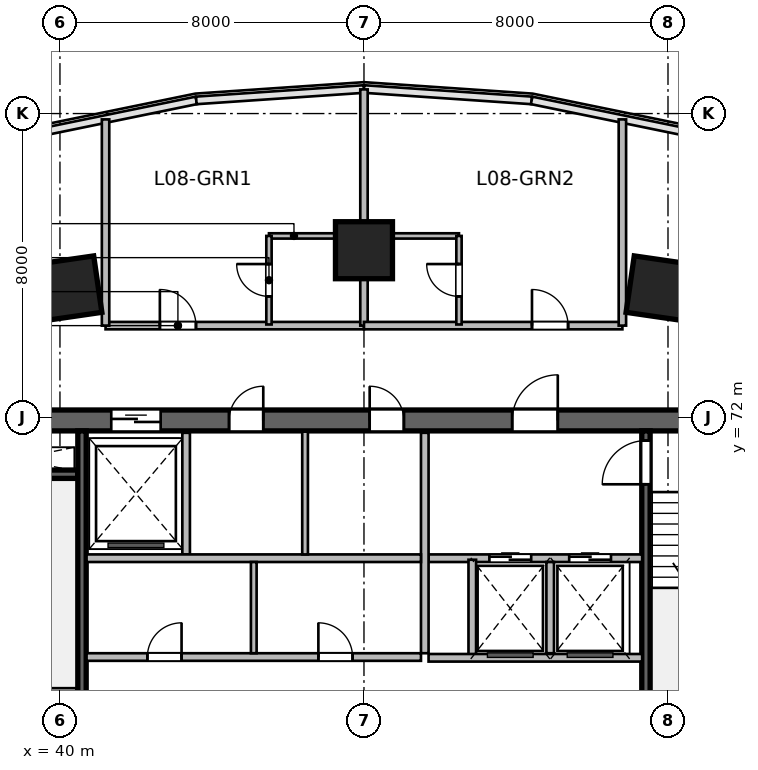
"""IFC4 building model, lengths in metres.
Left out: names, types, materials, properties, quantities, classifications, styles, units other than length and angle.
Written with IfcOpenShell. Run it as: python <this file> out.ifc"""

import sys

from ifc_helpers import new_model, si_unit, direction, frame, frame_2d, origin, origin_2d, place, context, subcontext, project, spatial, rectangle, extrude, source, transform, mapped, element, fill, save


model = new_model("IFC4")
c1 = context("Model", 3, precision=1e-05, world=origin(), true_north=direction((0.0, 1.0)))
c2 = subcontext(c1, "Body", "Model", "MODEL_VIEW")
j1 = project(units=[si_unit("LENGTHUNIT", "METRE"), si_unit("PLANEANGLEUNIT", "RADIAN")], contexts=[c1])
p1 = place(None, origin())
s1 = spatial("IfcSite", under=j1, at=p1, CompositionType="ELEMENT")
p2 = place(p1, origin())
s2 = spatial("IfcBuilding", under=s1, at=p2, CompositionType="ELEMENT")
p3 = place(p2, frame((0.0, 0.0, 42.6)))
s3 = spatial("IfcBuildingStorey", under=s2, at=p3, CompositionType="ELEMENT", Elevation=42.6)
m1 = source(origin(), c2, "Body", "SweptSolid", [
    extrude(rectangle(XDim=21.6, YDim=0.55, at=frame_2d((10.8, 0.0))), origin(), (0.0, 0.0, 1.0), 3.6),
])
p4 = place(p3, frame((37.2, 71.925, 0.0), z_axis=(0.0, 0.0, 1.0), x_axis=(1.0, 0.0, 0.0)))
e1 = element("IfcWall", 1, at=p4, inside=s3, PredefinedType="SHEAR", context=c2, shape_type="MappedRepresentation", body=[
    mapped(m1, transform((0.0, 0.0, 0.0), scale=1.0)),
])
p5 = place(p4, frame((1.2, 0.0, 0.0)))
e2 = element("IfcOpeningElement", 2, at=p5, cuts=e1, PredefinedType="OPENING", context=c2, shape_type="SweptSolid", body=[
    extrude(rectangle(XDim=0.9, YDim=2.1, at=frame_2d((0.45, 1.05))), frame((0.0, 0.285, 0.0), z_axis=(0.0, -1.0, 0.0), x_axis=(1.0, 0.0, 0.0)), (0.0, 0.0, 1.0), 0.57),
])
p6 = place(p4, frame((14.7, 0.0, 0.0)))
e3 = element("IfcOpeningElement", 3, at=p6, cuts=e1, PredefinedType="OPENING", context=c2, shape_type="SweptSolid", body=[
    extrude(rectangle(XDim=1.2, YDim=2.15, at=frame_2d((0.6, 1.075))), frame((0.0, 0.285, 0.0), z_axis=(0.0, -1.0, 0.0), x_axis=(1.0, 0.0, 0.0)), (0.0, 0.0, 1.0), 0.57),
])
p7 = place(p4, frame((4.15, 0.0, 0.0)))
e4 = element("IfcOpeningElement", 4, at=p7, cuts=e1, PredefinedType="OPENING", context=c2, shape_type="SweptSolid", body=[
    extrude(rectangle(XDim=1.3, YDim=2.15, at=frame_2d((0.65, 1.075))), frame((0.0, 0.285, 0.0), z_axis=(0.0, -1.0, 0.0), x_axis=(1.0, 0.0, 0.0)), (0.0, 0.0, 1.0), 0.57),
])
p8 = place(p4, frame((7.25, 0.0, 0.0)))
e5 = element("IfcOpeningElement", 5, at=p8, cuts=e1, PredefinedType="OPENING", context=c2, shape_type="SweptSolid", body=[
    extrude(rectangle(XDim=0.9, YDim=2.1, at=frame_2d((0.45, 1.05))), frame((0.0, 0.285, 0.0), z_axis=(0.0, -1.0, 0.0), x_axis=(1.0, 0.0, 0.0)), (0.0, 0.0, 1.0), 0.57),
])
p9 = place(p4, frame((10.95, 0.0, 0.0)))
e6 = element("IfcOpeningElement", 6, at=p9, cuts=e1, PredefinedType="OPENING", context=c2, shape_type="SweptSolid", body=[
    extrude(rectangle(XDim=0.9, YDim=2.1, at=frame_2d((0.45, 1.05))), frame((0.0, 0.285, 0.0), z_axis=(0.0, -1.0, 0.0), x_axis=(1.0, 0.0, 0.0)), (0.0, 0.0, 1.0), 0.57),
])
m2 = source(origin(), c2, "Body", "SweptSolid", [
    extrude(rectangle(XDim=3.27, YDim=0.22, at=frame_2d((1.635, 0.0))), origin(), (0.0, 0.0, 1.0), 3.6),
])
p10 = place(p3, frame((37.2, 70.51, 0.0), z_axis=(0.0, 0.0, 1.0), x_axis=(1.0, 0.0, 0.0)))
e7 = element("IfcWall", 7, at=p10, inside=s3, PredefinedType="SHEAR", context=c2, shape_type="MappedRepresentation", body=[
    mapped(m2, transform((0.0, 0.0, 0.0), scale=1.0)),
])
m3 = source(origin(), c2, "Body", "SweptSolid", [
    extrude(rectangle(XDim=10.9, YDim=0.22, at=frame_2d((5.45, 0.0))), origin(), (0.0, 0.0, 1.0), 3.6),
])
p11 = place(p3, frame((40.58, 60.75, 0.0), z_axis=(0.0, 0.0, 1.0), x_axis=(0.0, 1.0, 0.0)))
e8 = element("IfcWall", 8, at=p11, inside=s3, PredefinedType="SHEAR", context=c2, shape_type="MappedRepresentation", body=[
    mapped(m3, transform((0.0, 0.0, 0.0), scale=1.0)),
])
p12 = place(p3, frame((55.42, 60.75, 0.0), z_axis=(0.0, 0.0, 1.0), x_axis=(0.0, 1.0, 0.0)))
e9 = element("IfcWall", 9, at=p12, inside=s3, PredefinedType="SHEAR", context=c2, shape_type="MappedRepresentation", body=[
    mapped(m3, transform((0.0, 0.0, 0.0), scale=1.0)),
])
p13 = place(p12, frame((9.495, 0.0, 0.0)))
e10 = element("IfcOpeningElement", 10, at=p13, cuts=e9, PredefinedType="OPENING", context=c2, shape_type="SweptSolid", body=[
    extrude(rectangle(XDim=1.15, YDim=2.15, at=frame_2d((0.575, 1.075))), frame((0.0, 0.12, 0.0), z_axis=(0.0, -1.0, 0.0), x_axis=(1.0, 0.0, 0.0)), (0.0, 0.0, 1.0), 0.24),
])
m4 = source(origin(), c2, "Body", "SweptSolid", [
    extrude(rectangle(XDim=1.5, YDim=1.5, at=origin_2d()), origin(), (0.0, 0.0, 1.0), 3.6),
])
for number, where, z_axis, x_axis in (
    (11, (40.253, 75.404, 0.0), (0.0, 0.0, 1.0), (-0.143, 0.99, 0.0)),
    (12, (48.0, 76.404, 0.0), (0.0, 0.0, 1.0), (0.0, 1.0, 0.0)),
    (13, (55.747, 75.404, 0.0), (0.0, 0.0, 1.0), (0.143, 0.99, 0.0)),
):
    element("IfcColumn", number, at=place(p3, frame(where, z_axis=z_axis, x_axis=x_axis)), inside=s3, PredefinedType="COLUMN", context=c2, shape_type="MappedRepresentation", body=[
        mapped(m4, transform((0.0, 0.0, 0.0), scale=1.0)),
    ])
m5 = source(origin(), c2, "Body", "SweptSolid", [
    extrude(rectangle(XDim=5.62, YDim=0.2, at=frame_2d((2.81, 0.0))), origin(), (0.0, 0.0, 1.0), 3.36),
])
p14 = place(p3, frame((49.7, 68.3, 0.0), z_axis=(0.0, 0.0, 1.0), x_axis=(1.0, 0.0, 0.0)))
e14 = element("IfcWall", 14, at=p14, inside=s3, PredefinedType="SOLIDWALL", context=c2, shape_type="MappedRepresentation", body=[
    mapped(m5, transform((0.0, 0.0, 0.0), scale=1.0)),
])
p15 = place(p14, frame((1.6, 0.0, 0.0)))
e15 = element("IfcOpeningElement", 15, at=p15, cuts=e14, PredefinedType="OPENING", context=c2, shape_type="SweptSolid", body=[
    extrude(rectangle(XDim=1.1, YDim=2.15, at=frame_2d((0.55, 1.075))), frame((0.0, 0.11, 0.0), z_axis=(0.0, -1.0, 0.0), x_axis=(1.0, 0.0, 0.0)), (0.0, 0.0, 1.0), 0.22),
])
p16 = place(p14, frame((3.7, 0.0, 0.0)))
e16 = element("IfcOpeningElement", 16, at=p16, cuts=e14, PredefinedType="OPENING", context=c2, shape_type="SweptSolid", body=[
    extrude(rectangle(XDim=1.1, YDim=2.15, at=frame_2d((0.55, 1.075))), frame((0.0, 0.11, 0.0), z_axis=(0.0, -1.0, 0.0), x_axis=(1.0, 0.0, 0.0)), (0.0, 0.0, 1.0), 0.22),
])
m6 = source(origin(), c2, "Body", "SweptSolid", [
    extrude(rectangle(XDim=5.8, YDim=0.2, at=frame_2d((2.9, 0.0))), origin(), (0.0, 0.0, 1.0), 3.36),
])
p17 = place(p3, frame((49.6, 65.8, 0.0), z_axis=(0.0, 0.0, 1.0), x_axis=(0.0, 1.0, 0.0)))
e17 = element("IfcWall", 17, at=p17, inside=s3, PredefinedType="SOLIDWALL", context=c2, shape_type="MappedRepresentation", body=[
    mapped(m6, transform((0.0, 0.0, 0.0), scale=1.0)),
])
m7 = source(origin(), c2, "Body", "SweptSolid", [
    extrude(rectangle(XDim=2.58, YDim=0.2, at=frame_2d((1.29, 0.0))), origin(), (0.0, 0.0, 1.0), 3.36),
])
p18 = place(p3, frame((50.85, 65.68, 0.0), z_axis=(0.0, 0.0, 1.0), x_axis=(0.0, 1.0, 0.0)))
e18 = element("IfcWall", 18, at=p18, inside=s3, PredefinedType="SOLIDWALL", context=c2, shape_type="MappedRepresentation", body=[
    mapped(m7, transform((0.0, 0.0, 0.0), scale=1.0)),
])
m8 = source(origin(), c2, "Body", "SweptSolid", [
    extrude(rectangle(XDim=2.4, YDim=0.2, at=frame_2d((1.2, 0.0))), origin(), (0.0, 0.0, 1.0), 3.36),
])
p19 = place(p3, frame((52.9, 65.8, 0.0), z_axis=(0.0, 0.0, 1.0), x_axis=(0.0, 1.0, 0.0)))
e19 = element("IfcWall", 19, at=p19, inside=s3, PredefinedType="SOLIDWALL", context=c2, shape_type="MappedRepresentation", body=[
    mapped(m8, transform((0.0, 0.0, 0.0), scale=1.0)),
])
p20 = place(p3, frame((49.7, 65.68, 0.0), z_axis=(0.0, 0.0, 1.0), x_axis=(1.0, 0.0, 0.0)))
e20 = element("IfcWall", 20, at=p20, inside=s3, PredefinedType="SOLIDWALL", context=c2, shape_type="MappedRepresentation", body=[
    mapped(m5, transform((0.0, 0.0, 0.0), scale=1.0)),
])
m9 = source(origin(), c2, "Body", "SweptSolid", [
    extrude(rectangle(XDim=3.2, YDim=0.2, at=frame_2d((1.6, 0.0))), origin(), (0.0, 0.0, 1.0), 3.36),
])
p21 = place(p3, frame((43.32, 68.4, 0.0), z_axis=(0.0, 0.0, 1.0), x_axis=(0.0, 1.0, 0.0)))
e21 = element("IfcWall", 21, at=p21, inside=s3, PredefinedType="SOLIDWALL", context=c2, shape_type="MappedRepresentation", body=[
    mapped(m9, transform((0.0, 0.0, 0.0), scale=1.0)),
])
m10 = source(origin(), c2, "Body", "SweptSolid", [
    extrude(rectangle(XDim=8.8, YDim=0.2, at=frame_2d((4.4, 0.0))), origin(), (0.0, 0.0, 1.0), 3.36),
])
p22 = place(p3, frame((40.7, 68.3, 0.0), z_axis=(0.0, 0.0, 1.0), x_axis=(1.0, 0.0, 0.0)))
e22 = element("IfcWall", 22, at=p22, inside=s3, PredefinedType="SOLIDWALL", context=c2, shape_type="MappedRepresentation", body=[
    mapped(m10, transform((0.0, 0.0, 0.0), scale=1.0)),
])
m11 = source(origin(), c2, "Body", "SweptSolid", [
    extrude(rectangle(XDim=3.23, YDim=0.15, at=frame_2d((1.615, 0.0))), origin(), (0.0, 0.0, 1.0), 3.36),
])
p23 = place(p3, frame((46.45, 68.4, 0.0), z_axis=(0.0, 0.0, 1.0), x_axis=(0.0, 1.0, 0.0)))
e23 = element("IfcWall", 23, at=p23, inside=s3, PredefinedType="PARTITIONING", context=c2, shape_type="MappedRepresentation", body=[
    mapped(m11, transform((0.0, 0.0, 0.0), scale=1.0)),
])
p24 = place(p3, frame((40.7, 65.7, 0.0), z_axis=(0.0, 0.0, 1.0), x_axis=(1.0, 0.0, 0.0)))
e24 = element("IfcWall", 24, at=p24, inside=s3, PredefinedType="SOLIDWALL", context=c2, shape_type="MappedRepresentation", body=[
    mapped(m10, transform((0.0, 0.0, 0.0), scale=1.0)),
])
p25 = place(p24, frame((1.6, 0.0, 0.0)))
e25 = element("IfcOpeningElement", 25, at=p25, cuts=e24, PredefinedType="OPENING", context=c2, shape_type="SweptSolid", body=[
    extrude(rectangle(XDim=0.9, YDim=2.1, at=frame_2d((0.45, 1.05))), frame((0.0, 0.11, 0.0), z_axis=(0.0, -1.0, 0.0), x_axis=(1.0, 0.0, 0.0)), (0.0, 0.0, 1.0), 0.22),
])
p26 = place(p24, frame((6.1, 0.0, 0.0)))
e26 = element("IfcOpeningElement", 26, at=p26, cuts=e24, PredefinedType="OPENING", context=c2, shape_type="SweptSolid", body=[
    extrude(rectangle(XDim=0.9, YDim=2.1, at=frame_2d((0.45, 1.05))), frame((0.0, 0.11, 0.0), z_axis=(0.0, -1.0, 0.0), x_axis=(1.0, 0.0, 0.0)), (0.0, 0.0, 1.0), 0.22),
])
m12 = source(origin(), c2, "Body", "SweptSolid", [
    extrude(rectangle(XDim=2.4, YDim=0.15, at=frame_2d((1.2, 0.0))), origin(), (0.0, 0.0, 1.0), 3.36),
])
p27 = place(p3, frame((45.1, 65.8, 0.0), z_axis=(0.0, 0.0, 1.0), x_axis=(0.0, 1.0, 0.0)))
e27 = element("IfcWall", 27, at=p27, inside=s3, PredefinedType="PARTITIONING", context=c2, shape_type="MappedRepresentation", body=[
    mapped(m12, transform((0.0, 0.0, 0.0), scale=1.0)),
])
m13 = source(origin(), c2, "Body", "SweptSolid", [
    extrude(rectangle(XDim=6.8, YDim=0.195, at=frame_2d((3.4, 0.0))), origin(), (0.0, 0.0, 1.0), 3.36),
])
p28 = place(p3, frame((41.2, 74.42, 0.0), z_axis=(0.0, 0.0, 1.0), x_axis=(1.0, 0.0, 0.0)))
e28 = element("IfcWall", 28, at=p28, inside=s3, PredefinedType="PARTITIONING", context=c2, shape_type="MappedRepresentation", body=[
    mapped(m13, transform((0.0, 0.0, 0.0), scale=1.0)),
])
p29 = place(p28, frame((1.429, 0.0, 0.0)))
e29 = element("IfcOpeningElement", 29, at=p29, cuts=e28, PredefinedType="OPENING", context=c2, shape_type="SweptSolid", body=[
    extrude(rectangle(XDim=0.95, YDim=2.15, at=frame_2d((0.475, 1.075))), frame((0.0, 0.107, 0.0), z_axis=(0.0, -1.0, 0.0), x_axis=(1.0, 0.0, 0.0)), (0.0, 0.0, 1.0), 0.215),
])
m14 = source(origin(), c2, "Body", "SweptSolid", [
    extrude(rectangle(XDim=6.216, YDim=0.195, at=frame_2d((3.108, 0.0))), origin(), (0.0, 0.0, 1.0), 2.644),
])
p30 = place(p3, frame((48.0, 74.42, 0.0), z_axis=(0.0, 0.0, 1.0), x_axis=(0.0, 1.0, 0.0)))
e30 = element("IfcWall", 30, at=p30, inside=s3, PredefinedType="PARTITIONING", context=c2, shape_type="MappedRepresentation", body=[
    mapped(m14, transform((0.0, 0.0, 0.0), scale=1.0)),
])
m15 = source(origin(), c2, "Body", "SweptSolid", [
    extrude(rectangle(XDim=5.426, YDim=0.195, at=frame_2d((2.713, 0.0))), origin(), (0.0, 0.0, 1.0), 3.36),
])
p31 = place(p3, frame((41.2, 74.42, 0.0), z_axis=(0.0, 0.0, 1.0), x_axis=(0.0, 1.0, 0.0)))
e31 = element("IfcWall", 31, at=p31, inside=s3, PredefinedType="PARTITIONING", context=c2, shape_type="MappedRepresentation", body=[
    mapped(m15, transform((0.0, 0.0, 0.0), scale=1.0)),
])
m16 = source(origin(), c2, "Body", "SweptSolid", [
    extrude(rectangle(XDim=2.35, YDim=0.14, at=frame_2d((1.175, 0.0))), origin(), (0.0, 0.0, 1.0), 3.36),
])
p32 = place(p3, frame((45.5, 76.78, 0.0), z_axis=(0.0, 0.0, 1.0), x_axis=(1.0, 0.0, 0.0)))
e32 = element("IfcWall", 32, at=p32, inside=s3, PredefinedType="PARTITIONING", context=c2, shape_type="MappedRepresentation", body=[
    mapped(m16, transform((0.0, 0.0, 0.0), scale=1.0)),
])
m17 = source(origin(), c2, "Body", "SweptSolid", [
    extrude(rectangle(XDim=2.33, YDim=0.14, at=frame_2d((1.165, 0.0))), origin(), (0.0, 0.0, 1.0), 3.36),
])
p33 = place(p3, frame((45.5, 74.45, 0.0), z_axis=(0.0, 0.0, 1.0), x_axis=(0.0, 1.0, 0.0)))
e33 = element("IfcWall", 33, at=p33, inside=s3, PredefinedType="PARTITIONING", context=c2, shape_type="MappedRepresentation", body=[
    mapped(m17, transform((0.0, 0.0, 0.0), scale=1.0)),
])
p34 = place(p33, frame((0.74, 0.0, 0.0)))
e34 = element("IfcOpeningElement", 34, at=p34, cuts=e33, PredefinedType="OPENING", context=c2, shape_type="SweptSolid", body=[
    extrude(rectangle(XDim=0.85, YDim=2.05, at=frame_2d((0.425, 1.025))), frame((0.0, 0.08, 0.0), z_axis=(0.0, -1.0, 0.0), x_axis=(1.0, 0.0, 0.0)), (0.0, 0.0, 1.0), 0.16),
])
p35 = place(p3, frame((48.0, 74.42, 0.0), z_axis=(0.0, 0.0, 1.0), x_axis=(1.0, 0.0, 0.0)))
e35 = element("IfcWall", 35, at=p35, inside=s3, PredefinedType="PARTITIONING", context=c2, shape_type="MappedRepresentation", body=[
    mapped(m13, transform((0.0, 0.0, 0.0), scale=1.0)),
])
p36 = place(p35, frame((4.421, 0.0, 0.0)))
e36 = element("IfcOpeningElement", 36, at=p36, cuts=e35, PredefinedType="OPENING", context=c2, shape_type="SweptSolid", body=[
    extrude(rectangle(XDim=0.95, YDim=2.15, at=frame_2d((0.475, 1.075))), frame((0.0, 0.107, 0.0), z_axis=(0.0, -1.0, 0.0), x_axis=(1.0, 0.0, 0.0)), (0.0, 0.0, 1.0), 0.215),
])
p37 = place(p3, frame((54.8, 74.42, 0.0), z_axis=(0.0, 0.0, 1.0), x_axis=(0.0, 1.0, 0.0)))
e37 = element("IfcWall", 37, at=p37, inside=s3, PredefinedType="PARTITIONING", context=c2, shape_type="MappedRepresentation", body=[
    mapped(m15, transform((0.0, 0.0, 0.0), scale=1.0)),
])
p38 = place(p3, frame((48.15, 76.78, 0.0), z_axis=(0.0, 0.0, 1.0), x_axis=(1.0, 0.0, 0.0)))
e38 = element("IfcWall", 38, at=p38, inside=s3, PredefinedType="PARTITIONING", context=c2, shape_type="MappedRepresentation", body=[
    mapped(m16, transform((0.0, 0.0, 0.0), scale=1.0)),
])
p39 = place(p3, frame((50.5, 74.45, 0.0), z_axis=(0.0, 0.0, 1.0), x_axis=(0.0, 1.0, 0.0)))
e39 = element("IfcWall", 39, at=p39, inside=s3, PredefinedType="PARTITIONING", context=c2, shape_type="MappedRepresentation", body=[
    mapped(m17, transform((0.0, 0.0, 0.0), scale=1.0)),
])
p40 = place(p39, frame((0.74, 0.0, 0.0)))
e40 = element("IfcOpeningElement", 40, at=p40, cuts=e39, PredefinedType="OPENING", context=c2, shape_type="SweptSolid", body=[
    extrude(rectangle(XDim=0.85, YDim=2.05, at=frame_2d((0.425, 1.025))), frame((0.0, 0.08, 0.0), z_axis=(0.0, -1.0, 0.0), x_axis=(1.0, 0.0, 0.0)), (0.0, 0.0, 1.0), 0.16),
])
m18 = source(origin(), c2, "Body", "SweptSolid", [
    extrude(rectangle(XDim=1.15, YDim=2.15, at=frame_2d((0.575, 1.075))), frame((0.0, 0.025, 0.0), z_axis=(0.0, -1.0, 0.0), x_axis=(1.0, 0.0, 0.0)), (0.0, 0.0, 1.0), 0.05),
])
p41 = place(p13, origin())
e41 = element("IfcDoor", 41, at=p41, inside=s3, OperationType="SINGLE_SWING_LEFT", PredefinedType="DOOR", context=c2, shape_type="MappedRepresentation", body=[
    mapped(m18, transform((0.0, 0.0, 0.0), scale=1.0)),
])
fill(e10, e41)
m19 = source(origin(), c2, "Body", "SweptSolid", [
    extrude(rectangle(XDim=1.2, YDim=2.15, at=frame_2d((0.6, 1.075))), frame((0.0, 0.025, 0.0), z_axis=(0.0, -1.0, 0.0), x_axis=(1.0, 0.0, 0.0)), (0.0, 0.0, 1.0), 0.05),
])
p42 = place(p6, origin())
e42 = element("IfcDoor", 42, at=p42, inside=s3, OperationType="SINGLE_SWING_RIGHT", PredefinedType="DOOR", context=c2, shape_type="MappedRepresentation", body=[
    mapped(m19, transform((0.0, 0.0, 0.0), scale=1.0)),
])
fill(e3, e42)
m20 = source(origin(), c2, "Body", "SweptSolid", [
    extrude(rectangle(XDim=1.1, YDim=2.15, at=frame_2d((0.55, 1.075))), frame((0.0, 0.025, 0.0), z_axis=(0.0, -1.0, 0.0), x_axis=(1.0, 0.0, 0.0)), (0.0, 0.0, 1.0), 0.05),
])
p43 = place(p15, origin())
e43 = element("IfcDoor", 43, at=p43, inside=s3, OperationType="DOUBLE_DOOR_SLIDING", PredefinedType="DOOR", context=c2, shape_type="MappedRepresentation", body=[
    mapped(m20, transform((0.0, 0.0, 0.0), scale=1.0)),
])
fill(e15, e43)
p44 = place(p16, origin())
e44 = element("IfcDoor", 44, at=p44, inside=s3, OperationType="DOUBLE_DOOR_SLIDING", PredefinedType="DOOR", context=c2, shape_type="MappedRepresentation", body=[
    mapped(m20, transform((0.0, 0.0, 0.0), scale=1.0)),
])
fill(e16, e44)
m21 = source(origin(), c2, "Body", "SweptSolid", [
    extrude(rectangle(XDim=1.3, YDim=2.15, at=frame_2d((0.65, 1.075))), frame((0.0, 0.025, 0.0), z_axis=(0.0, -1.0, 0.0), x_axis=(1.0, 0.0, 0.0)), (0.0, 0.0, 1.0), 0.05),
])
p45 = place(p7, origin())
e45 = element("IfcDoor", 45, at=p45, inside=s3, OperationType="DOUBLE_DOOR_SLIDING", PredefinedType="DOOR", context=c2, shape_type="MappedRepresentation", body=[
    mapped(m21, transform((0.0, 0.0, 0.0), scale=1.0)),
])
fill(e4, e45)
m22 = source(origin(), c2, "Body", "SweptSolid", [
    extrude(rectangle(XDim=0.9, YDim=2.1, at=frame_2d((0.45, 1.05))), frame((0.0, 0.025, 0.0), z_axis=(0.0, -1.0, 0.0), x_axis=(1.0, 0.0, 0.0)), (0.0, 0.0, 1.0), 0.05),
])
p46 = place(p8, origin())
e46 = element("IfcDoor", 46, at=p46, inside=s3, OperationType="SINGLE_SWING_RIGHT", PredefinedType="DOOR", context=c2, shape_type="MappedRepresentation", body=[
    mapped(m22, transform((0.0, 0.0, 0.0), scale=1.0)),
])
fill(e5, e46)
p47 = place(p9, origin())
e47 = element("IfcDoor", 47, at=p47, inside=s3, OperationType="SINGLE_SWING_LEFT", PredefinedType="DOOR", context=c2, shape_type="MappedRepresentation", body=[
    mapped(m22, transform((0.0, 0.0, 0.0), scale=1.0)),
])
fill(e6, e47)
p48 = place(p25, origin())
e48 = element("IfcDoor", 48, at=p48, inside=s3, OperationType="SINGLE_SWING_RIGHT", PredefinedType="DOOR", context=c2, shape_type="MappedRepresentation", body=[
    mapped(m22, transform((0.0, 0.0, 0.0), scale=1.0)),
])
fill(e25, e48)
p49 = place(p26, origin())
e49 = element("IfcDoor", 49, at=p49, inside=s3, OperationType="SINGLE_SWING_LEFT", PredefinedType="DOOR", context=c2, shape_type="MappedRepresentation", body=[
    mapped(m22, transform((0.0, 0.0, 0.0), scale=1.0)),
])
fill(e26, e49)
m23 = source(origin(), c2, "Body", "SweptSolid", [
    extrude(rectangle(XDim=0.95, YDim=2.15, at=frame_2d((0.475, 1.075))), frame((0.0, 0.025, 0.0), z_axis=(0.0, -1.0, 0.0), x_axis=(1.0, 0.0, 0.0)), (0.0, 0.0, 1.0), 0.05),
])
p50 = place(p29, origin())
e50 = element("IfcDoor", 50, at=p50, inside=s3, OperationType="SINGLE_SWING_LEFT", PredefinedType="DOOR", context=c2, shape_type="MappedRepresentation", body=[
    mapped(m23, transform((0.0, 0.0, 0.0), scale=1.0)),
])
fill(e29, e50)
m24 = source(origin(), c2, "Body", "SweptSolid", [
    extrude(rectangle(XDim=0.85, YDim=2.05, at=frame_2d((0.425, 1.025))), frame((0.0, 0.025, 0.0), z_axis=(0.0, -1.0, 0.0), x_axis=(1.0, 0.0, 0.0)), (0.0, 0.0, 1.0), 0.05),
])
p51 = place(p34, origin())
e51 = element("IfcDoor", 51, at=p51, inside=s3, OperationType="SINGLE_SWING_RIGHT", PredefinedType="DOOR", context=c2, shape_type="MappedRepresentation", body=[
    mapped(m24, transform((0.0, 0.0, 0.0), scale=1.0)),
])
fill(e34, e51)
p52 = place(p36, origin())
e52 = element("IfcDoor", 52, at=p52, inside=s3, OperationType="SINGLE_SWING_LEFT", PredefinedType="DOOR", context=c2, shape_type="MappedRepresentation", body=[
    mapped(m23, transform((0.0, 0.0, 0.0), scale=1.0)),
])
fill(e36, e52)
p53 = place(p40, origin())
e53 = element("IfcDoor", 53, at=p53, inside=s3, OperationType="SINGLE_SWING_RIGHT", PredefinedType="DOOR", context=c2, shape_type="MappedRepresentation", body=[
    mapped(m24, transform((0.0, 0.0, 0.0), scale=1.0)),
])
fill(e40, e53)
save(model, sys.argv[1])
